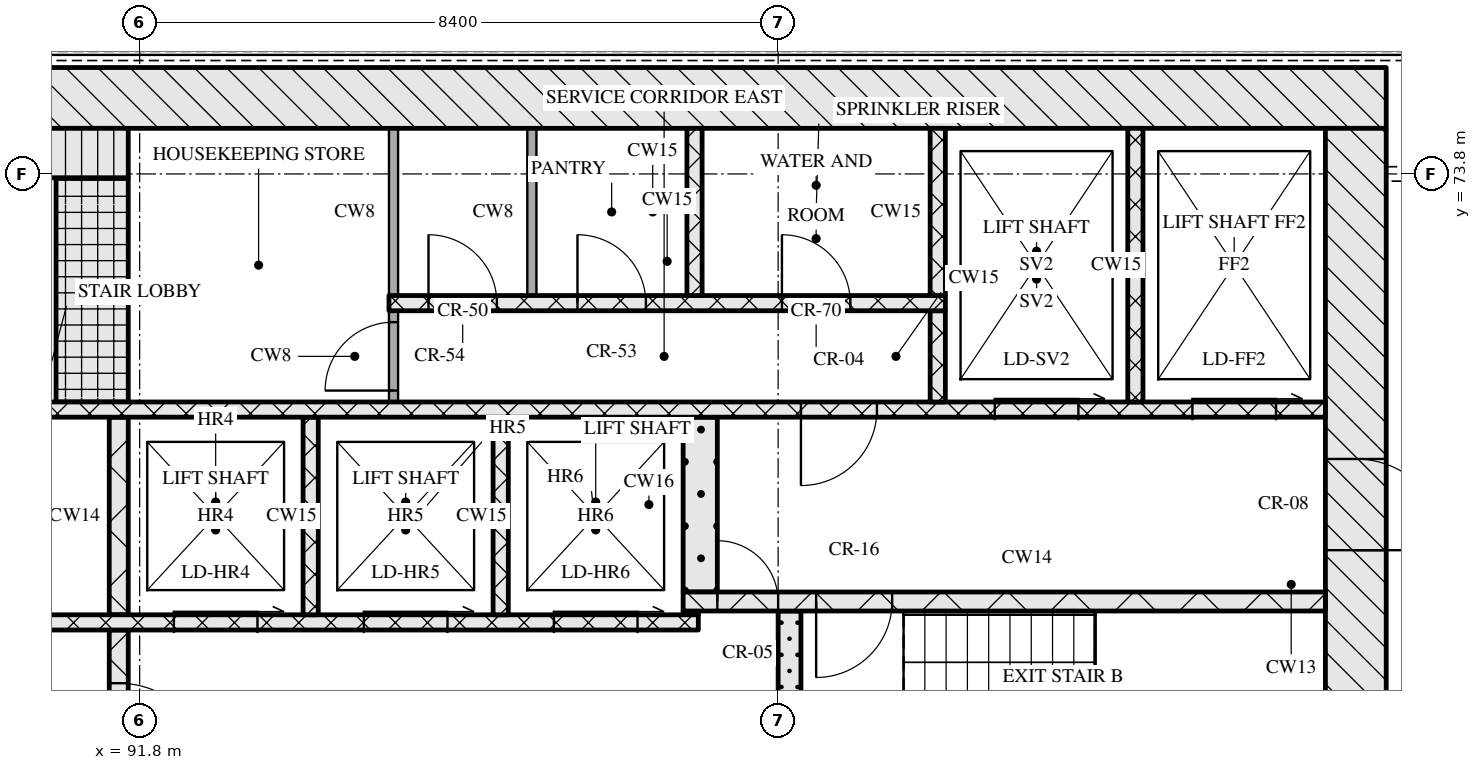
"""IFC4 building model, lengths in metres.
Left out: names, types, materials, properties, quantities, classifications, styles, units other than length and angle.
Written with IfcOpenShell. Run it as: python <this file> out.ifc"""

import sys

from ifc_helpers import new_model, si_unit, direction, frame, frame_2d, origin, place, context, subcontext, project, spatial, rectangle, extrude, element, fill, save


model = new_model("IFC4")
c1 = context("Model", 3, precision=1e-05, world=origin(), true_north=direction((0.0, 1.0)))
c2 = subcontext(c1, "Body", "Model", "MODEL_VIEW")
j1 = project(units=[si_unit("LENGTHUNIT", "METRE"), si_unit("PLANEANGLEUNIT", "RADIAN")], contexts=[c1])
p1 = place(None, origin())
s1 = spatial("IfcSite", under=j1, at=p1, CompositionType="ELEMENT")
p2 = place(p1, origin())
s2 = spatial("IfcBuilding", under=s1, at=p2, CompositionType="ELEMENT")
p3 = place(p2, frame((0.0, 0.0, 169.05)))
s3 = spatial("IfcBuildingStorey", under=s2, at=p3, CompositionType="ELEMENT", Elevation=169.05)
p4 = place(p3, frame((67.0, 74.8, 0.0), z_axis=(0.0, 0.0, 1.0), x_axis=(1.0, 0.0, 0.0)))
e1 = element("IfcWall", 1, at=p4, inside=s3, PredefinedType="SOLIDWALL", context=c2, shape_type="SweptSolid", body=[
    extrude(rectangle(XDim=41.2, YDim=0.8, at=frame_2d((20.6, 0.0))), origin(), (0.0, 0.0, 1.0), 3.32),
])
p5 = place(p3, frame((107.8, 62.4, 0.0), z_axis=(0.0, 0.0, 1.0), x_axis=(0.0, 1.0, 0.0)))
e2 = element("IfcWall", 2, at=p5, inside=s3, PredefinedType="SOLIDWALL", context=c2, shape_type="SweptSolid", body=[
    extrude(rectangle(XDim=12.0, YDim=0.8, at=frame_2d((6.0, 0.0))), origin(), (0.0, 0.0, 1.0), 3.32),
])
p6 = place(p5, frame((6.45, 0.0, 0.0)))
e3 = element("IfcOpeningElement", 3, at=p6, cuts=e2, PredefinedType="OPENING", context=c2, shape_type="SweptSolid", body=[
    extrude(rectangle(XDim=1.2, YDim=2.1, at=frame_2d((0.6, 1.05))), frame((0.0, 0.41, 0.0), z_axis=(0.0, -1.0, 0.0), x_axis=(1.0, 0.0, 0.0)), (0.0, 0.0, 1.0), 0.82),
])
p7 = place(p3, frame((91.525, 65.2, 0.0), z_axis=(0.0, 0.0, 1.0), x_axis=(0.0, 1.0, 0.0)))
e4 = element("IfcWall", 4, at=p7, inside=s3, PredefinedType="SOLIDWALL", context=c2, shape_type="SweptSolid", body=[
    extrude(rectangle(XDim=2.6, YDim=0.25, at=frame_2d((1.3, 0.0))), origin(), (0.0, 0.0, 1.0), 3.32),
])
p8 = place(p7, frame((0.7, 0.0, 0.0)))
e5 = element("IfcOpeningElement", 5, at=p8, cuts=e4, PredefinedType="OPENING", context=c2, shape_type="SweptSolid", body=[
    extrude(rectangle(XDim=1.2, YDim=2.1, at=frame_2d((0.6, 1.05))), frame((0.0, 0.135, 0.0), z_axis=(0.0, -1.0, 0.0), x_axis=(1.0, 0.0, 0.0)), (0.0, 0.0, 1.0), 0.27),
])
p9 = place(p3, frame((100.35, 65.2, 0.0), z_axis=(0.0, 0.0, 1.0), x_axis=(0.0, 1.0, 0.0)))
e6 = element("IfcWall", 6, at=p9, inside=s3, PredefinedType="SOLIDWALL", context=c2, shape_type="SweptSolid", body=[
    extrude(rectangle(XDim=2.85, YDim=0.3, at=frame_2d((1.425, 0.0))), origin(), (0.0, 0.0, 1.0), 3.32),
])
p10 = place(p3, frame((76.05, 67.9, 0.0), z_axis=(0.0, 0.0, 1.0), x_axis=(1.0, 0.0, 0.0)))
e7 = element("IfcWall", 7, at=p10, inside=s3, PredefinedType="SOLIDWALL", context=c2, shape_type="SweptSolid", body=[
    extrude(rectangle(XDim=23.1, YDim=0.2, at=frame_2d((11.55, 0.0))), origin(), (0.0, 0.0, 1.0), 3.32),
])
p11 = place(p10, frame((1.35, 0.0, 0.0)))
e8 = element("IfcOpeningElement", 8, at=p11, cuts=e7, PredefinedType="OPENING", context=c2, shape_type="SweptSolid", body=[
    extrude(rectangle(XDim=0.9, YDim=2.1, at=frame_2d((0.45, 1.05))), frame((0.0, 0.11, 0.0), z_axis=(0.0, -1.0, 0.0), x_axis=(1.0, 0.0, 0.0)), (0.0, 0.0, 1.0), 0.22),
])
p12 = place(p10, frame((5.06, 0.0, 0.0)))
e9 = element("IfcOpeningElement", 9, at=p12, cuts=e7, PredefinedType="OPENING", context=c2, shape_type="SweptSolid", body=[
    extrude(rectangle(XDim=0.9, YDim=2.1, at=frame_2d((0.45, 1.05))), frame((0.0, 0.11, 0.0), z_axis=(0.0, -1.0, 0.0), x_axis=(1.0, 0.0, 0.0)), (0.0, 0.0, 1.0), 0.22),
])
p13 = place(p10, frame((8.45, 0.0, 0.0)))
e10 = element("IfcOpeningElement", 10, at=p13, cuts=e7, PredefinedType="OPENING", context=c2, shape_type="SweptSolid", body=[
    extrude(rectangle(XDim=0.9, YDim=2.1, at=frame_2d((0.45, 1.05))), frame((0.0, 0.11, 0.0), z_axis=(0.0, -1.0, 0.0), x_axis=(1.0, 0.0, 0.0)), (0.0, 0.0, 1.0), 0.22),
])
p14 = place(p10, frame((10.91, 0.0, 0.0)))
e11 = element("IfcOpeningElement", 11, at=p14, cuts=e7, PredefinedType="OPENING", context=c2, shape_type="SweptSolid", body=[
    extrude(rectangle(XDim=0.9, YDim=2.1, at=frame_2d((0.45, 1.05))), frame((0.0, 0.11, 0.0), z_axis=(0.0, -1.0, 0.0), x_axis=(1.0, 0.0, 0.0)), (0.0, 0.0, 1.0), 0.22),
])
p15 = place(p10, frame((13.55, 0.0, 0.0)))
e12 = element("IfcOpeningElement", 12, at=p15, cuts=e7, PredefinedType="OPENING", context=c2, shape_type="SweptSolid", body=[
    extrude(rectangle(XDim=1.0, YDim=2.1, at=frame_2d((0.5, 1.05))), frame((0.0, 0.11, 0.0), z_axis=(0.0, -1.0, 0.0), x_axis=(1.0, 0.0, 0.0)), (0.0, 0.0, 1.0), 0.22),
])
p16 = place(p10, frame((16.2, 0.0, 0.0)))
e13 = element("IfcOpeningElement", 13, at=p16, cuts=e7, PredefinedType="OPENING", context=c2, shape_type="SweptSolid", body=[
    extrude(rectangle(XDim=1.1, YDim=2.1, at=frame_2d((0.55, 1.05))), frame((0.0, 0.11, 0.0), z_axis=(0.0, -1.0, 0.0), x_axis=(1.0, 0.0, 0.0)), (0.0, 0.0, 1.0), 0.22),
])
p17 = place(p10, frame((18.7, 0.0, 0.0)))
e14 = element("IfcOpeningElement", 14, at=p17, cuts=e7, PredefinedType="OPENING", context=c2, shape_type="SweptSolid", body=[
    extrude(rectangle(XDim=1.1, YDim=2.1, at=frame_2d((0.55, 1.05))), frame((0.0, 0.11, 0.0), z_axis=(0.0, -1.0, 0.0), x_axis=(1.0, 0.0, 0.0)), (0.0, 0.0, 1.0), 0.22),
])
p18 = place(p10, frame((21.2, 0.0, 0.0)))
e15 = element("IfcOpeningElement", 15, at=p18, cuts=e7, PredefinedType="OPENING", context=c2, shape_type="SweptSolid", body=[
    extrude(rectangle(XDim=1.1, YDim=2.1, at=frame_2d((0.55, 1.05))), frame((0.0, 0.11, 0.0), z_axis=(0.0, -1.0, 0.0), x_axis=(1.0, 0.0, 0.0)), (0.0, 0.0, 1.0), 0.22),
])
p19 = place(p3, frame((91.525, 68.0, 0.0), z_axis=(0.0, 0.0, 1.0), x_axis=(0.0, 1.0, 0.0)))
e16 = element("IfcWall", 16, at=p19, inside=s3, PredefinedType="SOLIDWALL", context=c2, shape_type="SweptSolid", body=[
    extrude(rectangle(XDim=2.6, YDim=0.25, at=frame_2d((1.3, 0.0))), origin(), (0.0, 0.0, 1.0), 3.32),
])
for number, where, z_axis, x_axis in (
    (17, (94.05, 68.0, 0.0), (0.0, 0.0, 1.0), (0.0, 1.0, 0.0)),
    (18, (96.55, 68.0, 0.0), (0.0, 0.0, 1.0), (0.0, 1.0, 0.0)),
):
    element("IfcWall", number, at=place(p3, frame(where, z_axis=z_axis, x_axis=x_axis)), inside=s3, PredefinedType="SOLIDWALL", context=c2, shape_type="SweptSolid", body=[
        extrude(rectangle(XDim=2.6, YDim=0.2, at=frame_2d((1.3, 0.0))), origin(), (0.0, 0.0, 1.0), 3.32),
    ])
p20 = place(p3, frame((98.95, 68.025, 0.0), z_axis=(0.0, 0.0, 1.0), x_axis=(1.0, 0.0, 0.0)))
e19 = element("IfcWall", 19, at=p20, inside=s3, PredefinedType="SOLIDWALL", context=c2, shape_type="SweptSolid", body=[
    extrude(rectangle(XDim=0.2, YDim=0.05, at=frame_2d((0.1, 0.0))), origin(), (0.0, 0.0, 1.0), 3.32),
])
p21 = place(p3, frame((98.95, 68.175, 0.0), z_axis=(0.0, 0.0, 1.0), x_axis=(1.0, 0.0, 0.0)))
e20 = element("IfcWall", 20, at=p21, inside=s3, PredefinedType="SOLIDWALL", context=c2, shape_type="SweptSolid", body=[
    extrude(rectangle(XDim=8.45, YDim=0.25, at=frame_2d((4.225, 0.0))), origin(), (0.0, 0.0, 1.0), 3.32),
])
p22 = place(p21, frame((0.45, 0.0, 0.0)))
e21 = element("IfcOpeningElement", 21, at=p22, cuts=e20, PredefinedType="OPENING", context=c2, shape_type="SweptSolid", body=[
    extrude(rectangle(XDim=0.8, YDim=2.1, at=frame_2d((0.4, 1.05))), frame((0.0, 0.135, 0.0), z_axis=(0.0, -1.0, 0.0), x_axis=(1.0, 0.0, 0.0)), (0.0, 0.0, 1.0), 0.27),
])
p23 = place(p21, frame((1.75, 0.0, 0.0)))
e22 = element("IfcOpeningElement", 22, at=p23, cuts=e20, PredefinedType="OPENING", context=c2, shape_type="SweptSolid", body=[
    extrude(rectangle(XDim=1.0, YDim=2.1, at=frame_2d((0.5, 1.05))), frame((0.0, 0.135, 0.0), z_axis=(0.0, -1.0, 0.0), x_axis=(1.0, 0.0, 0.0)), (0.0, 0.0, 1.0), 0.27),
])
p24 = place(p3, frame((99.175, 68.3, 0.0), z_axis=(0.0, 0.0, 1.0), x_axis=(0.0, 1.0, 0.0)))
e23 = element("IfcWall", 23, at=p24, inside=s3, PredefinedType="SOLIDWALL", context=c2, shape_type="SweptSolid", body=[
    extrude(rectangle(XDim=2.3, YDim=0.45, at=frame_2d((1.15, 0.0))), origin(), (0.0, 0.0, 1.0), 3.32),
])
p25 = place(p3, frame((67.8, 70.7, 0.0), z_axis=(0.0, 0.0, 1.0), x_axis=(1.0, 0.0, 0.0)))
e24 = element("IfcWall", 24, at=p25, inside=s3, PredefinedType="SOLIDWALL", context=c2, shape_type="SweptSolid", body=[
    extrude(rectangle(XDim=39.6, YDim=0.2, at=frame_2d((19.8, 0.0))), origin(), (0.0, 0.0, 1.0), 3.32),
])
p26 = place(p25, frame((0.65, 0.0, 0.0)))
e25 = element("IfcOpeningElement", 25, at=p26, cuts=e24, PredefinedType="OPENING", context=c2, shape_type="SweptSolid", body=[
    extrude(rectangle(XDim=1.1, YDim=2.1, at=frame_2d((0.55, 1.05))), frame((0.0, 0.11, 0.0), z_axis=(0.0, -1.0, 0.0), x_axis=(1.0, 0.0, 0.0)), (0.0, 0.0, 1.0), 0.22),
])
p27 = place(p25, frame((3.25, 0.0, 0.0)))
e26 = element("IfcOpeningElement", 26, at=p27, cuts=e24, PredefinedType="OPENING", context=c2, shape_type="SweptSolid", body=[
    extrude(rectangle(XDim=1.1, YDim=2.1, at=frame_2d((0.55, 1.05))), frame((0.0, 0.11, 0.0), z_axis=(0.0, -1.0, 0.0), x_axis=(1.0, 0.0, 0.0)), (0.0, 0.0, 1.0), 0.22),
])
p28 = place(p25, frame((5.9, 0.0, 0.0)))
e27 = element("IfcOpeningElement", 27, at=p28, cuts=e24, PredefinedType="OPENING", context=c2, shape_type="SweptSolid", body=[
    extrude(rectangle(XDim=1.0, YDim=2.1, at=frame_2d((0.5, 1.05))), frame((0.0, 0.11, 0.0), z_axis=(0.0, -1.0, 0.0), x_axis=(1.0, 0.0, 0.0)), (0.0, 0.0, 1.0), 0.22),
])
p29 = place(p25, frame((21.7, 0.0, 0.0)))
e28 = element("IfcOpeningElement", 28, at=p29, cuts=e24, PredefinedType="OPENING", context=c2, shape_type="SweptSolid", body=[
    extrude(rectangle(XDim=1.0, YDim=2.1, at=frame_2d((0.5, 1.05))), frame((0.0, 0.11, 0.0), z_axis=(0.0, -1.0, 0.0), x_axis=(1.0, 0.0, 0.0)), (0.0, 0.0, 1.0), 0.22),
])
p30 = place(p25, frame((32.7, 0.0, 0.0)))
e29 = element("IfcOpeningElement", 29, at=p30, cuts=e24, PredefinedType="OPENING", context=c2, shape_type="SweptSolid", body=[
    extrude(rectangle(XDim=1.0, YDim=2.1, at=frame_2d((0.5, 1.05))), frame((0.0, 0.11, 0.0), z_axis=(0.0, -1.0, 0.0), x_axis=(1.0, 0.0, 0.0)), (0.0, 0.0, 1.0), 0.22),
])
p31 = place(p25, frame((35.25, 0.0, 0.0)))
e30 = element("IfcOpeningElement", 30, at=p31, cuts=e24, PredefinedType="OPENING", context=c2, shape_type="SweptSolid", body=[
    extrude(rectangle(XDim=1.1, YDim=2.1, at=frame_2d((0.55, 1.05))), frame((0.0, 0.11, 0.0), z_axis=(0.0, -1.0, 0.0), x_axis=(1.0, 0.0, 0.0)), (0.0, 0.0, 1.0), 0.22),
])
p32 = place(p25, frame((37.85, 0.0, 0.0)))
e31 = element("IfcOpeningElement", 31, at=p32, cuts=e24, PredefinedType="OPENING", context=c2, shape_type="SweptSolid", body=[
    extrude(rectangle(XDim=1.1, YDim=2.1, at=frame_2d((0.55, 1.05))), frame((0.0, 0.11, 0.0), z_axis=(0.0, -1.0, 0.0), x_axis=(1.0, 0.0, 0.0)), (0.0, 0.0, 1.0), 0.22),
])
p33 = place(p3, frame((91.175, 70.8, 0.0), z_axis=(0.0, 0.0, 1.0), x_axis=(0.0, 1.0, 0.0)))
e32 = element("IfcWall", 32, at=p33, inside=s3, PredefinedType="SOLIDWALL", context=c2, shape_type="SweptSolid", body=[
    extrude(rectangle(XDim=2.95, YDim=0.95, at=frame_2d((1.475, 0.0))), origin(), (0.0, 0.0, 1.0), 3.32),
])
p34 = place(p3, frame((95.14, 70.8, 0.0), z_axis=(0.0, 0.0, 1.0), x_axis=(0.0, 1.0, 0.0)))
e33 = element("IfcWall", 33, at=p34, inside=s3, PredefinedType="PARTITIONING", context=c2, shape_type="SweptSolid", body=[
    extrude(rectangle(XDim=1.2, YDim=0.12, at=frame_2d((0.6, 0.0))), origin(), (0.0, 0.0, 1.0), 3.32),
])
p35 = place(p34, frame((0.15, 0.0, 0.0)))
e34 = element("IfcOpeningElement", 34, at=p35, cuts=e33, PredefinedType="OPENING", context=c2, shape_type="SweptSolid", body=[
    extrude(rectangle(XDim=0.9, YDim=2.1, at=frame_2d((0.45, 1.05))), frame((0.0, 0.07, 0.0), z_axis=(0.0, -1.0, 0.0), x_axis=(1.0, 0.0, 0.0)), (0.0, 0.0, 1.0), 0.14),
])
p36 = place(p3, frame((102.3, 70.8, 0.0), z_axis=(0.0, 0.0, 1.0), x_axis=(0.0, 1.0, 0.0)))
e35 = element("IfcWall", 35, at=p36, inside=s3, PredefinedType="SOLIDWALL", context=c2, shape_type="SweptSolid", body=[
    extrude(rectangle(XDim=1.2, YDim=0.2, at=frame_2d((0.6, 0.0))), origin(), (0.0, 0.0, 1.0), 3.32),
])
p37 = place(p3, frame((104.9, 70.8, 0.0), z_axis=(0.0, 0.0, 1.0), x_axis=(0.0, 1.0, 0.0)))
e36 = element("IfcWall", 36, at=p37, inside=s3, PredefinedType="SOLIDWALL", context=c2, shape_type="SweptSolid", body=[
    extrude(rectangle(XDim=3.6, YDim=0.2, at=frame_2d((1.8, 0.0))), origin(), (0.0, 0.0, 1.0), 3.32),
])
p38 = place(p3, frame((95.08, 72.1, 0.0), z_axis=(0.0, 0.0, 1.0), x_axis=(1.0, 0.0, 0.0)))
e37 = element("IfcWall", 37, at=p38, inside=s3, PredefinedType="SOLIDWALL", context=c2, shape_type="SweptSolid", body=[
    extrude(rectangle(XDim=7.32, YDim=0.2, at=frame_2d((3.66, 0.0))), origin(), (0.0, 0.0, 1.0), 3.32),
])
p39 = place(p38, frame((0.52, 0.0, 0.0)))
e38 = element("IfcOpeningElement", 38, at=p39, cuts=e37, PredefinedType="OPENING", context=c2, shape_type="SweptSolid", body=[
    extrude(rectangle(XDim=0.9, YDim=2.1, at=frame_2d((0.45, 1.05))), frame((0.0, 0.11, 0.0), z_axis=(0.0, -1.0, 0.0), x_axis=(1.0, 0.0, 0.0)), (0.0, 0.0, 1.0), 0.22),
])
p40 = place(p38, frame((2.48, 0.0, 0.0)))
e39 = element("IfcOpeningElement", 39, at=p40, cuts=e37, PredefinedType="OPENING", context=c2, shape_type="SweptSolid", body=[
    extrude(rectangle(XDim=0.9, YDim=2.1, at=frame_2d((0.45, 1.05))), frame((0.0, 0.11, 0.0), z_axis=(0.0, -1.0, 0.0), x_axis=(1.0, 0.0, 0.0)), (0.0, 0.0, 1.0), 0.22),
])
p41 = place(p38, frame((5.17, 0.0, 0.0)))
e40 = element("IfcOpeningElement", 40, at=p41, cuts=e37, PredefinedType="OPENING", context=c2, shape_type="SweptSolid", body=[
    extrude(rectangle(XDim=0.9, YDim=2.1, at=frame_2d((0.45, 1.05))), frame((0.0, 0.11, 0.0), z_axis=(0.0, -1.0, 0.0), x_axis=(1.0, 0.0, 0.0)), (0.0, 0.0, 1.0), 0.22),
])
for number, where, z_axis, x_axis in (
    (41, (95.14, 72.2, 0.0), (0.0, 0.0, 1.0), (0.0, 1.0, 0.0)),
    (42, (96.96, 72.2, 0.0), (0.0, 0.0, 1.0), (0.0, 1.0, 0.0)),
):
    element("IfcWall", number, at=place(p3, frame(where, z_axis=z_axis, x_axis=x_axis)), inside=s3, PredefinedType="PARTITIONING", context=c2, shape_type="SweptSolid", body=[
        extrude(rectangle(XDim=2.2, YDim=0.12, at=frame_2d((1.1, 0.0))), origin(), (0.0, 0.0, 1.0), 3.32),
    ])
for number, where, z_axis, x_axis in (
    (43, (99.1, 72.2, 0.0), (0.0, 0.0, 1.0), (0.0, 1.0, 0.0)),
    (44, (102.3, 72.2, 0.0), (0.0, 0.0, 1.0), (0.0, 1.0, 0.0)),
):
    element("IfcWall", number, at=place(p3, frame(where, z_axis=z_axis, x_axis=x_axis)), inside=s3, PredefinedType="SOLIDWALL", context=c2, shape_type="SweptSolid", body=[
        extrude(rectangle(XDim=2.2, YDim=0.2, at=frame_2d((1.1, 0.0))), origin(), (0.0, 0.0, 1.0), 3.32),
    ])
p42 = place(p3, frame((83.55, 74.075, 0.0), z_axis=(0.0, 0.0, 1.0), x_axis=(1.0, 0.0, 0.0)))
e45 = element("IfcWall", 45, at=p42, inside=s3, PredefinedType="SOLIDWALL", context=c2, shape_type="SweptSolid", body=[
    extrude(rectangle(XDim=8.1, YDim=0.65, at=frame_2d((4.05, 0.0))), origin(), (0.0, 0.0, 1.0), 3.32),
])
p43 = place(p8, origin())
e46 = element("IfcDoor", 46, at=p43, inside=s3, OperationType="SINGLE_SWING_RIGHT", PredefinedType="DOOR", context=c2, shape_type="SweptSolid", body=[
    extrude(rectangle(XDim=1.2, YDim=2.1, at=frame_2d((0.6, 1.05))), frame((0.0, 0.025, 0.0), z_axis=(0.0, -1.0, 0.0), x_axis=(1.0, 0.0, 0.0)), (0.0, 0.0, 1.0), 0.05),
])
fill(e5, e46)
p44 = place(p16, origin())
e47 = element("IfcDoor", 47, at=p44, inside=s3, OperationType="SLIDING_TO_RIGHT", PredefinedType="DOOR", context=c2, shape_type="SweptSolid", body=[
    extrude(rectangle(XDim=1.1, YDim=2.1, at=frame_2d((0.55, 1.05))), frame((0.0, 0.025, 0.0), z_axis=(0.0, -1.0, 0.0), x_axis=(1.0, 0.0, 0.0)), (0.0, 0.0, 1.0), 0.05),
])
fill(e13, e47)
p45 = place(p17, origin())
e48 = element("IfcDoor", 48, at=p45, inside=s3, OperationType="SLIDING_TO_RIGHT", PredefinedType="DOOR", context=c2, shape_type="SweptSolid", body=[
    extrude(rectangle(XDim=1.1, YDim=2.1, at=frame_2d((0.55, 1.05))), frame((0.0, 0.025, 0.0), z_axis=(0.0, -1.0, 0.0), x_axis=(1.0, 0.0, 0.0)), (0.0, 0.0, 1.0), 0.05),
])
fill(e14, e48)
p46 = place(p18, origin())
e49 = element("IfcDoor", 49, at=p46, inside=s3, OperationType="SLIDING_TO_RIGHT", PredefinedType="DOOR", context=c2, shape_type="SweptSolid", body=[
    extrude(rectangle(XDim=1.1, YDim=2.1, at=frame_2d((0.55, 1.05))), frame((0.0, 0.025, 0.0), z_axis=(0.0, -1.0, 0.0), x_axis=(1.0, 0.0, 0.0)), (0.0, 0.0, 1.0), 0.05),
])
fill(e15, e49)
p47 = place(p22, origin())
e50 = element("IfcDoor", 50, at=p47, inside=s3, OperationType="SINGLE_SWING_LEFT", PredefinedType="DOOR", context=c2, shape_type="SweptSolid", body=[
    extrude(rectangle(XDim=0.8, YDim=2.1, at=frame_2d((0.4, 1.05))), frame((0.0, 0.025, 0.0), z_axis=(0.0, -1.0, 0.0), x_axis=(1.0, 0.0, 0.0)), (0.0, 0.0, 1.0), 0.05),
])
fill(e21, e50)
p48 = place(p23, origin())
e51 = element("IfcDoor", 51, at=p48, inside=s3, OperationType="SINGLE_SWING_RIGHT", PredefinedType="DOOR", context=c2, shape_type="SweptSolid", body=[
    extrude(rectangle(XDim=1.0, YDim=2.1, at=frame_2d((0.5, 1.05))), frame((0.0, 0.025, 0.0), z_axis=(0.0, -1.0, 0.0), x_axis=(1.0, 0.0, 0.0)), (0.0, 0.0, 1.0), 0.05),
])
fill(e22, e51)
p49 = place(p6, origin())
e52 = element("IfcDoor", 52, at=p49, inside=s3, OperationType="SINGLE_SWING_RIGHT", PredefinedType="DOOR", context=c2, shape_type="SweptSolid", body=[
    extrude(rectangle(XDim=1.2, YDim=2.1, at=frame_2d((0.6, 1.05))), frame((0.0, 0.025, 0.0), z_axis=(0.0, -1.0, 0.0), x_axis=(1.0, 0.0, 0.0)), (0.0, 0.0, 1.0), 0.05),
])
fill(e3, e52)
p50 = place(p30, origin())
e53 = element("IfcDoor", 53, at=p50, inside=s3, OperationType="SINGLE_SWING_RIGHT", PredefinedType="DOOR", context=c2, shape_type="SweptSolid", body=[
    extrude(rectangle(XDim=1.0, YDim=2.1, at=frame_2d((0.5, 1.05))), frame((0.0, 0.025, 0.0), z_axis=(0.0, -1.0, 0.0), x_axis=(1.0, 0.0, 0.0)), (0.0, 0.0, 1.0), 0.05),
])
fill(e29, e53)
p51 = place(p31, origin())
e54 = element("IfcDoor", 54, at=p51, inside=s3, OperationType="SLIDING_TO_RIGHT", PredefinedType="DOOR", context=c2, shape_type="SweptSolid", body=[
    extrude(rectangle(XDim=1.1, YDim=2.1, at=frame_2d((0.55, 1.05))), frame((0.0, 0.025, 0.0), z_axis=(0.0, -1.0, 0.0), x_axis=(1.0, 0.0, 0.0)), (0.0, 0.0, 1.0), 0.05),
])
fill(e30, e54)
p52 = place(p32, origin())
e55 = element("IfcDoor", 55, at=p52, inside=s3, OperationType="SLIDING_TO_RIGHT", PredefinedType="DOOR", context=c2, shape_type="SweptSolid", body=[
    extrude(rectangle(XDim=1.1, YDim=2.1, at=frame_2d((0.55, 1.05))), frame((0.0, 0.025, 0.0), z_axis=(0.0, -1.0, 0.0), x_axis=(1.0, 0.0, 0.0)), (0.0, 0.0, 1.0), 0.05),
])
fill(e31, e55)
p53 = place(p35, origin())
e56 = element("IfcDoor", 56, at=p53, inside=s3, OperationType="SINGLE_SWING_LEFT", PredefinedType="DOOR", context=c2, shape_type="SweptSolid", body=[
    extrude(rectangle(XDim=0.9, YDim=2.1, at=frame_2d((0.45, 1.05))), frame((0.0, 0.025, 0.0), z_axis=(0.0, -1.0, 0.0), x_axis=(1.0, 0.0, 0.0)), (0.0, 0.0, 1.0), 0.05),
])
fill(e34, e56)
p54 = place(p39, origin())
e57 = element("IfcDoor", 57, at=p54, inside=s3, OperationType="SINGLE_SWING_LEFT", PredefinedType="DOOR", context=c2, shape_type="SweptSolid", body=[
    extrude(rectangle(XDim=0.9, YDim=2.1, at=frame_2d((0.45, 1.05))), frame((0.0, 0.025, 0.0), z_axis=(0.0, -1.0, 0.0), x_axis=(1.0, 0.0, 0.0)), (0.0, 0.0, 1.0), 0.05),
])
fill(e38, e57)
p55 = place(p40, origin())
e58 = element("IfcDoor", 58, at=p55, inside=s3, OperationType="SINGLE_SWING_LEFT", PredefinedType="DOOR", context=c2, shape_type="SweptSolid", body=[
    extrude(rectangle(XDim=0.9, YDim=2.1, at=frame_2d((0.45, 1.05))), frame((0.0, 0.025, 0.0), z_axis=(0.0, -1.0, 0.0), x_axis=(1.0, 0.0, 0.0)), (0.0, 0.0, 1.0), 0.05),
])
fill(e39, e58)
p56 = place(p41, origin())
e59 = element("IfcDoor", 59, at=p56, inside=s3, OperationType="SINGLE_SWING_LEFT", PredefinedType="DOOR", context=c2, shape_type="SweptSolid", body=[
    extrude(rectangle(XDim=0.9, YDim=2.1, at=frame_2d((0.45, 1.05))), frame((0.0, 0.025, 0.0), z_axis=(0.0, -1.0, 0.0), x_axis=(1.0, 0.0, 0.0)), (0.0, 0.0, 1.0), 0.05),
])
fill(e40, e59)
save(model, sys.argv[1])
